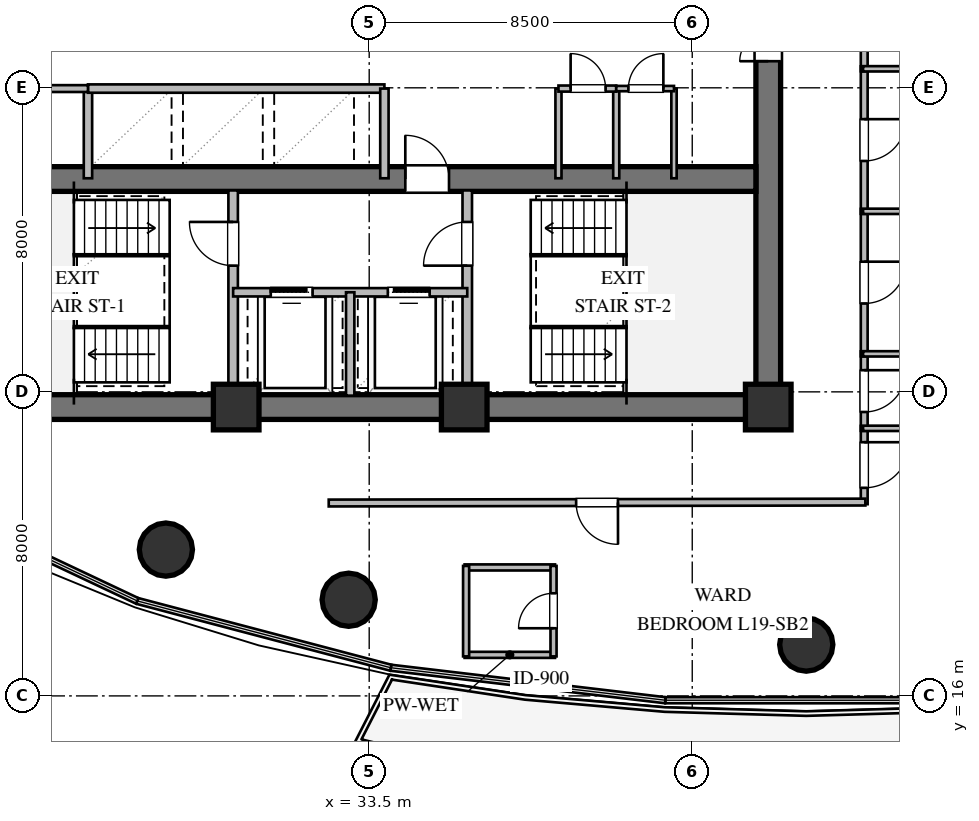
"""IFC4 building model, lengths in metres.
Left out: names, types, materials, properties, quantities, classifications, styles, units other than length and angle.
Written with IfcOpenShell. Run it as: python <this file> out.ifc"""

import sys

from ifc_helpers import new_model, si_unit, direction, frame, frame_2d, origin, origin_2d, place, context, subcontext, project, spatial, rectangle, circle, extrude, element, fill, save


model = new_model("IFC4")
c1 = context("Model", 3, precision=1e-05, world=origin(), true_north=direction((0.0, 1.0)))
c2 = subcontext(c1, "Body", "Model", "MODEL_VIEW")
j1 = project(units=[si_unit("LENGTHUNIT", "METRE"), si_unit("PLANEANGLEUNIT", "RADIAN")], contexts=[c1])
p1 = place(None, origin())
s1 = spatial("IfcSite", under=j1, at=p1, CompositionType="ELEMENT")
p2 = place(p1, origin())
s2 = spatial("IfcBuilding", under=s1, at=p2, CompositionType="ELEMENT")
p3 = place(p2, frame((0.0, 0.0, 74.4)))
s3 = spatial("IfcBuildingStorey", under=s2, at=p3, CompositionType="ELEMENT", Elevation=74.4)
p4 = place(p3, frame((21.675, 23.6, 0.0), z_axis=(0.0, 0.0, 1.0), x_axis=(1.0, 0.0, 0.0)))
e1 = element("IfcWall", 1, at=p4, inside=s3, PredefinedType="SHEAR", context=c2, shape_type="SweptSolid", body=[
    extrude(rectangle(XDim=22.65, YDim=0.65, at=frame_2d((11.325, 0.0))), origin(), (0.0, 0.0, 1.0), 3.36),
])
p5 = place(p3, frame((44.0, 23.925, 0.0), z_axis=(0.0, 0.0, 1.0), x_axis=(0.0, 1.0, 0.0)))
e2 = element("IfcWall", 2, at=p5, inside=s3, PredefinedType="SHEAR", context=c2, shape_type="SweptSolid", body=[
    extrude(rectangle(XDim=12.15, YDim=0.65, at=frame_2d((6.075, 0.0))), origin(), (0.0, 0.0, 1.0), 3.36),
])
p6 = place(p5, frame((8.775, 0.0, 0.0)))
e3 = element("IfcOpeningElement", 3, at=p6, cuts=e2, PredefinedType="OPENING", context=c2, shape_type="SweptSolid", body=[
    extrude(rectangle(XDim=1.5, YDim=2.15, at=frame_2d((0.75, 1.075))), frame((0.0, 0.335, 0.0), z_axis=(0.0, -1.0, 0.0), x_axis=(1.0, 0.0, 0.0)), (0.0, 0.0, 1.0), 0.67),
])
p7 = place(p3, frame((22.325, 29.6, 0.0), z_axis=(0.0, 0.0, 1.0), x_axis=(1.0, 0.0, 0.0)))
e4 = element("IfcWall", 4, at=p7, inside=s3, PredefinedType="SHEAR", context=c2, shape_type="SweptSolid", body=[
    extrude(rectangle(XDim=21.35, YDim=0.65, at=frame_2d((10.675, 0.0))), origin(), (0.0, 0.0, 1.0), 3.36),
])
p8 = place(p7, frame((12.125, 0.0, 0.0)))
e5 = element("IfcOpeningElement", 5, at=p8, cuts=e4, PredefinedType="OPENING", context=c2, shape_type="SweptSolid", body=[
    extrude(rectangle(XDim=1.15, YDim=2.1, at=frame_2d((0.575, 1.05))), frame((0.0, 0.335, 0.0), z_axis=(0.0, -1.0, 0.0), x_axis=(1.0, 0.0, 0.0)), (0.0, 0.0, 1.0), 0.67),
])
for number, where, z_axis, x_axis in (
    (6, (30.0, 23.6, 0.0), (0.0, 0.0, 1.0), (1.0, 0.0, 0.0)),
    (7, (36.0, 23.6, 0.0), (0.0, 0.0, 1.0), (1.0, 0.0, 0.0)),
    (8, (44.0, 23.6, 0.0), (0.0, 0.0, 1.0), (1.0, 0.0, 0.0)),
):
    element("IfcColumn", number, at=place(p3, frame(where, z_axis=z_axis, x_axis=x_axis)), inside=s3, PredefinedType="COLUMN", context=c2, shape_type="SweptSolid", body=[
        extrude(rectangle(XDim=1.2, YDim=1.2, at=origin_2d()), origin(), (0.0, 0.0, 1.0), 3.6),
    ])
for number, where, z_axis, x_axis in (
    (9, (28.15, 19.85, 0.0), (0.0, 0.0, 1.0), (1.0, 0.0, 0.0)),
    (10, (32.96, 18.53, 0.0), (0.0, 0.0, 1.0), (1.0, 0.0, 0.0)),
    (11, (45.0, 17.35, 0.0), (0.0, 0.0, 1.0), (1.0, 0.0, 0.0)),
):
    element("IfcColumn", number, at=place(p3, frame(where, z_axis=z_axis, x_axis=x_axis)), inside=s3, PredefinedType="COLUMN", context=c2, shape_type="SweptSolid", body=[
        extrude(circle(Radius=0.7, at=origin_2d()), origin(), (0.0, 0.0, 1.0), 3.6),
    ])
p9 = place(p3, frame((29.92, 23.9, 0.0), z_axis=(0.0, 0.0, 1.0), x_axis=(0.0, 1.0, 0.0)))
e12 = element("IfcWall", 12, at=p9, inside=s3, PredefinedType="SOLIDWALL", context=c2, shape_type="SweptSolid", body=[
    extrude(rectangle(XDim=5.4, YDim=0.25, at=frame_2d((2.7, 0.0))), origin(), (0.0, 0.0, 1.0), 3.36),
])
p10 = place(p9, frame((3.421, 0.0, 0.0)))
e13 = element("IfcOpeningElement", 13, at=p10, cuts=e12, PredefinedType="OPENING", context=c2, shape_type="SweptSolid", body=[
    extrude(rectangle(XDim=1.15, YDim=2.1, at=frame_2d((0.575, 1.05))), frame((0.0, 0.135, 0.0), z_axis=(0.0, -1.0, 0.0), x_axis=(1.0, 0.0, 0.0)), (0.0, 0.0, 1.0), 0.27),
])
p11 = place(p3, frame((36.08, 23.9, 0.0), z_axis=(0.0, 0.0, 1.0), x_axis=(0.0, 1.0, 0.0)))
e14 = element("IfcWall", 14, at=p11, inside=s3, PredefinedType="SOLIDWALL", context=c2, shape_type="SweptSolid", body=[
    extrude(rectangle(XDim=5.4, YDim=0.25, at=frame_2d((2.7, 0.0))), origin(), (0.0, 0.0, 1.0), 3.36),
])
p12 = place(p11, frame((3.421, 0.0, 0.0)))
e15 = element("IfcOpeningElement", 15, at=p12, cuts=e14, PredefinedType="OPENING", context=c2, shape_type="SweptSolid", body=[
    extrude(rectangle(XDim=1.15, YDim=2.1, at=frame_2d((0.575, 1.05))), frame((0.0, 0.135, 0.0), z_axis=(0.0, -1.0, 0.0), x_axis=(1.0, 0.0, 0.0)), (0.0, 0.0, 1.0), 0.27),
])
p13 = place(p3, frame((29.92, 26.62, 0.0), z_axis=(0.0, 0.0, 1.0), x_axis=(1.0, 0.0, 0.0)))
e16 = element("IfcWall", 16, at=p13, inside=s3, PredefinedType="SOLIDWALL", context=c2, shape_type="SweptSolid", body=[
    extrude(rectangle(XDim=6.16, YDim=0.22, at=frame_2d((3.08, 0.0))), origin(), (0.0, 0.0, 1.0), 3.36),
])
p14 = place(p13, frame((0.99, 0.0, 0.0)))
e17 = element("IfcOpeningElement", 17, at=p14, cuts=e16, PredefinedType="OPENING", context=c2, shape_type="SweptSolid", body=[
    extrude(rectangle(XDim=1.1, YDim=2.1, at=frame_2d((0.55, 1.05))), frame((0.0, 0.12, 0.0), z_axis=(0.0, -1.0, 0.0), x_axis=(1.0, 0.0, 0.0)), (0.0, 0.0, 1.0), 0.24),
])
p15 = place(p13, frame((4.07, 0.0, 0.0)))
e18 = element("IfcOpeningElement", 18, at=p15, cuts=e16, PredefinedType="OPENING", context=c2, shape_type="SweptSolid", body=[
    extrude(rectangle(XDim=1.1, YDim=2.1, at=frame_2d((0.55, 1.05))), frame((0.0, 0.12, 0.0), z_axis=(0.0, -1.0, 0.0), x_axis=(1.0, 0.0, 0.0)), (0.0, 0.0, 1.0), 0.24),
])
p16 = place(p3, frame((33.0, 23.9, 0.0), z_axis=(0.0, 0.0, 1.0), x_axis=(0.0, 1.0, 0.0)))
e19 = element("IfcWall", 19, at=p16, inside=s3, PredefinedType="SOLIDWALL", context=c2, shape_type="SweptSolid", body=[
    extrude(rectangle(XDim=2.72, YDim=0.22, at=frame_2d((1.36, 0.0))), origin(), (0.0, 0.0, 1.0), 3.36),
])
p17 = place(p3, frame((26.1, 29.62, 0.0), z_axis=(0.0, 0.0, 1.0), x_axis=(0.0, 1.0, 0.0)))
e20 = element("IfcWall", 20, at=p17, inside=s3, PredefinedType="SOLIDWALL", context=c2, shape_type="SweptSolid", body=[
    extrude(rectangle(XDim=2.36, YDim=0.22, at=frame_2d((1.18, 0.0))), origin(), (0.0, 0.0, 1.0), 3.36),
])
p18 = place(p3, frame((26.1, 31.98, 0.0), z_axis=(0.0, 0.0, 1.0), x_axis=(1.0, 0.0, 0.0)))
e21 = element("IfcWall", 21, at=p18, inside=s3, PredefinedType="SOLIDWALL", context=c2, shape_type="SweptSolid", body=[
    extrude(rectangle(XDim=7.8, YDim=0.22, at=frame_2d((3.9, 0.0))), origin(), (0.0, 0.0, 1.0), 3.36),
])
p19 = place(p3, frame((33.9, 29.62, 0.0), z_axis=(0.0, 0.0, 1.0), x_axis=(0.0, 1.0, 0.0)))
e22 = element("IfcWall", 22, at=p19, inside=s3, PredefinedType="SOLIDWALL", context=c2, shape_type="SweptSolid", body=[
    extrude(rectangle(XDim=2.36, YDim=0.22, at=frame_2d((1.18, 0.0))), origin(), (0.0, 0.0, 1.0), 3.36),
])
p20 = place(p3, frame((22.35, 31.98, 0.0), z_axis=(0.0, 0.0, 1.0), x_axis=(1.0, 0.0, 0.0)))
e23 = element("IfcWall", 23, at=p20, inside=s3, PredefinedType="PARTITIONING", context=c2, shape_type="SweptSolid", body=[
    extrude(rectangle(XDim=3.75, YDim=0.18, at=frame_2d((1.875, 0.0))), origin(), (0.0, 0.0, 1.0), 3.36),
])
p21 = place(p20, frame((1.425, 0.0, 0.0)))
e24 = element("IfcOpeningElement", 24, at=p21, cuts=e23, PredefinedType="OPENING", context=c2, shape_type="SweptSolid", body=[
    extrude(rectangle(XDim=0.92, YDim=2.1, at=frame_2d((0.46, 1.05))), frame((0.0, 0.1, 0.0), z_axis=(0.0, -1.0, 0.0), x_axis=(1.0, 0.0, 0.0)), (0.0, 0.0, 1.0), 0.2),
])
for number, where, z_axis, x_axis in (
    (25, (38.48, 29.62, 0.0), (0.0, 0.0, 1.0), (0.0, 1.0, 0.0)),
    (26, (40.0, 29.62, 0.0), (0.0, 0.0, 1.0), (0.0, 1.0, 0.0)),
):
    element("IfcWall", number, at=place(p3, frame(where, z_axis=z_axis, x_axis=x_axis)), inside=s3, PredefinedType="PLUMBINGWALL", context=c2, shape_type="SweptSolid", body=[
        extrude(rectangle(XDim=2.36, YDim=0.16, at=frame_2d((1.18, 0.0))), origin(), (0.0, 0.0, 1.0), 3.36),
    ])
p22 = place(p3, frame((41.52, 29.62, 0.0), z_axis=(0.0, 0.0, 1.0), x_axis=(0.0, 1.0, 0.0)))
e27 = element("IfcWall", 27, at=p22, inside=s3, PredefinedType="PARTITIONING", context=c2, shape_type="SweptSolid", body=[
    extrude(rectangle(XDim=2.36, YDim=0.14, at=frame_2d((1.18, 0.0))), origin(), (0.0, 0.0, 1.0), 3.36),
])
p23 = place(p3, frame((38.48, 31.98, 0.0), z_axis=(0.0, 0.0, 1.0), x_axis=(1.0, 0.0, 0.0)))
e28 = element("IfcWall", 28, at=p23, inside=s3, PredefinedType="PLUMBINGWALL", context=c2, shape_type="SweptSolid", body=[
    extrude(rectangle(XDim=1.52, YDim=0.16, at=frame_2d((0.76, 0.0))), origin(), (0.0, 0.0, 1.0), 3.36),
])
p24 = place(p23, frame((0.32, 0.0, 0.0)))
e29 = element("IfcOpeningElement", 29, at=p24, cuts=e28, PredefinedType="OPENING", context=c2, shape_type="SweptSolid", body=[
    extrude(rectangle(XDim=0.92, YDim=2.1, at=frame_2d((0.46, 1.05))), frame((0.0, 0.09, 0.0), z_axis=(0.0, -1.0, 0.0), x_axis=(1.0, 0.0, 0.0)), (0.0, 0.0, 1.0), 0.18),
])
p25 = place(p3, frame((40.0, 31.98, 0.0), z_axis=(0.0, 0.0, 1.0), x_axis=(1.0, 0.0, 0.0)))
e30 = element("IfcWall", 30, at=p25, inside=s3, PredefinedType="PARTITIONING", context=c2, shape_type="SweptSolid", body=[
    extrude(rectangle(XDim=1.52, YDim=0.14, at=frame_2d((0.76, 0.0))), origin(), (0.0, 0.0, 1.0), 3.36),
])
p26 = place(p25, frame((0.32, 0.0, 0.0)))
e31 = element("IfcOpeningElement", 31, at=p26, cuts=e30, PredefinedType="OPENING", context=c2, shape_type="SweptSolid", body=[
    extrude(rectangle(XDim=0.92, YDim=2.1, at=frame_2d((0.46, 1.05))), frame((0.0, 0.08, 0.0), z_axis=(0.0, -1.0, 0.0), x_axis=(1.0, 0.0, 0.0)), (0.0, 0.0, 1.0), 0.16),
])
for number, where, z_axis, x_axis in (
    (32, (36.01, 17.08, 0.0), (0.0, 0.0, 1.0), (1.0, 0.0, 0.0)),
    (33, (36.01, 19.38, 0.0), (0.0, 0.0, 1.0), (1.0, 0.0, 0.0)),
    (34, (36.05, 17.04, 0.0), (0.0, 0.0, 1.0), (0.0, 1.0, 0.0)),
):
    element("IfcWall", number, at=place(p3, frame(where, z_axis=z_axis, x_axis=x_axis)), inside=s3, PredefinedType="PLUMBINGWALL", context=c2, shape_type="SweptSolid", body=[
        extrude(rectangle(XDim=2.38, YDim=0.16, at=frame_2d((1.19, 0.0))), origin(), (0.0, 0.0, 1.0), 3.36),
    ])
p27 = place(p3, frame((38.35, 17.04, 0.0), z_axis=(0.0, 0.0, 1.0), x_axis=(0.0, 1.0, 0.0)))
e35 = element("IfcWall", 35, at=p27, inside=s3, PredefinedType="PLUMBINGWALL", context=c2, shape_type="SweptSolid", body=[
    extrude(rectangle(XDim=2.38, YDim=0.16, at=frame_2d((1.19, 0.0))), origin(), (0.0, 0.0, 1.0), 3.36),
])
p28 = place(p27, frame((0.74, 0.0, 0.0)))
e36 = element("IfcOpeningElement", 36, at=p28, cuts=e35, PredefinedType="OPENING", context=c2, shape_type="SweptSolid", body=[
    extrude(rectangle(XDim=0.92, YDim=2.1, at=frame_2d((0.46, 1.05))), frame((0.0, 0.09, 0.0), z_axis=(0.0, -1.0, 0.0), x_axis=(1.0, 0.0, 0.0)), (0.0, 0.0, 1.0), 0.18),
])
p29 = place(p3, frame((46.525, 23.105, 0.0), z_axis=(0.0, 0.0, 1.0), x_axis=(0.0, -1.0, 0.0)))
e37 = element("IfcWall", 37, at=p29, inside=s3, PredefinedType="PARTITIONING", context=c2, shape_type="SweptSolid", body=[
    extrude(rectangle(XDim=2.06, YDim=0.18, at=frame_2d((1.03, 0.0))), origin(), (0.0, 0.0, 1.0), 3.36),
])
p30 = place(p29, frame((0.43, 0.0, 0.0)))
e38 = element("IfcOpeningElement", 38, at=p30, cuts=e37, PredefinedType="OPENING", context=c2, shape_type="SweptSolid", body=[
    extrude(rectangle(XDim=1.2, YDim=2.15, at=frame_2d((0.6, 1.075))), frame((0.0, 0.1, 0.0), z_axis=(0.0, -1.0, 0.0), x_axis=(1.0, 0.0, 0.0)), (0.0, 0.0, 1.0), 0.2),
])
p31 = place(p3, frame((46.525, 25.065, 0.0), z_axis=(0.0, 0.0, 1.0), x_axis=(0.0, -1.0, 0.0)))
e39 = element("IfcWall", 39, at=p31, inside=s3, PredefinedType="PARTITIONING", context=c2, shape_type="SweptSolid", body=[
    extrude(rectangle(XDim=2.09, YDim=0.18, at=frame_2d((1.045, 0.0))), origin(), (0.0, 0.0, 1.0), 3.36),
])
p32 = place(p31, frame((0.495, 0.0, 0.0)))
e40 = element("IfcOpeningElement", 40, at=p32, cuts=e39, PredefinedType="OPENING", context=c2, shape_type="SweptSolid", body=[
    extrude(rectangle(XDim=1.1, YDim=2.1, at=frame_2d((0.55, 1.05))), frame((0.0, 0.1, 0.0), z_axis=(0.0, -1.0, 0.0), x_axis=(1.0, 0.0, 0.0)), (0.0, 0.0, 1.0), 0.2),
])
p33 = place(p3, frame((46.525, 28.815, 0.0), z_axis=(0.0, 0.0, 1.0), x_axis=(0.0, -1.0, 0.0)))
e41 = element("IfcWall", 41, at=p33, inside=s3, PredefinedType="PARTITIONING", context=c2, shape_type="SweptSolid", body=[
    extrude(rectangle(XDim=3.88, YDim=0.18, at=frame_2d((1.94, 0.0))), origin(), (0.0, 0.0, 1.0), 3.36),
])
p34 = place(p33, frame((1.39, 0.0, 0.0)))
e42 = element("IfcOpeningElement", 42, at=p34, cuts=e41, PredefinedType="OPENING", context=c2, shape_type="SweptSolid", body=[
    extrude(rectangle(XDim=1.1, YDim=2.1, at=frame_2d((0.55, 1.05))), frame((0.0, 0.1, 0.0), z_axis=(0.0, -1.0, 0.0), x_axis=(1.0, 0.0, 0.0)), (0.0, 0.0, 1.0), 0.2),
])
p35 = place(p3, frame((46.525, 32.565, 0.0), z_axis=(0.0, 0.0, 1.0), x_axis=(0.0, -1.0, 0.0)))
e43 = element("IfcWall", 43, at=p35, inside=s3, PredefinedType="PARTITIONING", context=c2, shape_type="SweptSolid", body=[
    extrude(rectangle(XDim=3.88, YDim=0.18, at=frame_2d((1.94, 0.0))), origin(), (0.0, 0.0, 1.0), 3.36),
])
p36 = place(p35, frame((1.39, 0.0, 0.0)))
e44 = element("IfcOpeningElement", 44, at=p36, cuts=e43, PredefinedType="OPENING", context=c2, shape_type="SweptSolid", body=[
    extrude(rectangle(XDim=1.1, YDim=2.1, at=frame_2d((0.55, 1.05))), frame((0.0, 0.1, 0.0), z_axis=(0.0, -1.0, 0.0), x_axis=(1.0, 0.0, 0.0)), (0.0, 0.0, 1.0), 0.2),
])
p37 = place(p3, frame((46.525, 35.775, 0.0), z_axis=(0.0, 0.0, 1.0), x_axis=(0.0, -1.0, 0.0)))
e45 = element("IfcWall", 45, at=p37, inside=s3, PredefinedType="PARTITIONING", context=c2, shape_type="SweptSolid", body=[
    extrude(rectangle(XDim=3.34, YDim=0.18, at=frame_2d((1.67, 0.0))), origin(), (0.0, 0.0, 1.0), 3.36),
])
p38 = place(p37, frame((1.12, 0.0, 0.0)))
e46 = element("IfcOpeningElement", 46, at=p38, cuts=e45, PredefinedType="OPENING", context=c2, shape_type="SweptSolid", body=[
    extrude(rectangle(XDim=1.1, YDim=2.1, at=frame_2d((0.55, 1.05))), frame((0.0, 0.1, 0.0), z_axis=(0.0, -1.0, 0.0), x_axis=(1.0, 0.0, 0.0)), (0.0, 0.0, 1.0), 0.2),
])
p39 = place(p3, frame((46.555, 21.1, 0.0), z_axis=(0.0, 0.0, 1.0), x_axis=(-0.999998414151, -0.001780925679, 0.0)))
e47 = element("IfcWall", 47, at=p39, inside=s3, PredefinedType="PARTITIONING", context=c2, shape_type="SweptSolid", body=[
    extrude(rectangle(XDim=14.12, YDim=0.18, at=frame_2d((7.06, 0.0))), origin(), (0.0, 0.0, 1.0), 2.996),
])
p40 = place(p39, frame((6.51, 0.0, 0.0)))
e48 = element("IfcOpeningElement", 48, at=p40, cuts=e47, PredefinedType="OPENING", context=c2, shape_type="SweptSolid", body=[
    extrude(rectangle(XDim=1.1, YDim=2.1, at=frame_2d((0.55, 1.05))), frame((0.0, 0.1, 0.0), z_axis=(0.0, -1.0, 0.0), x_axis=(1.0, 0.0, 0.0)), (0.0, 0.0, 1.0), 0.2),
])
p41 = place(p3, frame((46.495, 23.04, 0.0), z_axis=(0.0, 0.0, 1.0), x_axis=(1.0, 0.0, 0.0)))
e49 = element("IfcWall", 49, at=p41, inside=s3, PredefinedType="PARTITIONING", context=c2, shape_type="SweptSolid", body=[
    extrude(rectangle(XDim=24.806, YDim=0.14, at=frame_2d((12.403, 0.0))), origin(), (0.0, 0.0, 1.0), 2.89),
])
p42 = place(p3, frame((46.495, 25.0, 0.0), z_axis=(0.0, 0.0, 1.0), x_axis=(1.0, 0.0, 0.0)))
e50 = element("IfcWall", 50, at=p42, inside=s3, PredefinedType="PARTITIONING", context=c2, shape_type="SweptSolid", body=[
    extrude(rectangle(XDim=26.49, YDim=0.14, at=frame_2d((13.245, 0.0))), origin(), (0.0, 0.0, 1.0), 2.89),
])
p43 = place(p3, frame((46.495, 28.75, 0.0), z_axis=(0.0, 0.0, 1.0), x_axis=(1.0, 0.0, 0.0)))
e51 = element("IfcWall", 51, at=p43, inside=s3, PredefinedType="PARTITIONING", context=c2, shape_type="SweptSolid", body=[
    extrude(rectangle(XDim=29.548, YDim=0.14, at=frame_2d((14.774, 0.0))), origin(), (0.0, 0.0, 1.0), 2.89),
])
p44 = place(p3, frame((46.495, 32.5, 0.0), z_axis=(0.0, 0.0, 1.0), x_axis=(1.0, 0.0, 0.0)))
e52 = element("IfcWall", 52, at=p44, inside=s3, PredefinedType="PARTITIONING", context=c2, shape_type="SweptSolid", body=[
    extrude(rectangle(XDim=31.127, YDim=0.14, at=frame_2d((15.563, 0.0))), origin(), (0.0, 0.0, 1.0), 3.36),
])
p45 = place(p10, origin())
e53 = element("IfcDoor", 53, at=p45, inside=s3, OperationType="SINGLE_SWING_RIGHT", PredefinedType="DOOR", context=c2, shape_type="SweptSolid", body=[
    extrude(rectangle(XDim=1.15, YDim=2.1, at=frame_2d((0.575, 1.05))), frame((0.0, 0.025, 0.0), z_axis=(0.0, -1.0, 0.0), x_axis=(1.0, 0.0, 0.0)), (0.0, 0.0, 1.0), 0.05),
])
fill(e13, e53)
p46 = place(p12, origin())
e54 = element("IfcDoor", 54, at=p46, inside=s3, OperationType="SINGLE_SWING_LEFT", PredefinedType="DOOR", context=c2, shape_type="SweptSolid", body=[
    extrude(rectangle(XDim=1.15, YDim=2.1, at=frame_2d((0.575, 1.05))), frame((0.0, 0.025, 0.0), z_axis=(0.0, -1.0, 0.0), x_axis=(1.0, 0.0, 0.0)), (0.0, 0.0, 1.0), 0.05),
])
fill(e15, e54)
p47 = place(p14, origin())
e55 = element("IfcDoor", 55, at=p47, inside=s3, OperationType="SLIDING_TO_LEFT", PredefinedType="DOOR", context=c2, shape_type="SweptSolid", body=[
    extrude(rectangle(XDim=1.1, YDim=2.1, at=frame_2d((0.55, 1.05))), frame((0.0, 0.025, 0.0), z_axis=(0.0, -1.0, 0.0), x_axis=(1.0, 0.0, 0.0)), (0.0, 0.0, 1.0), 0.05),
])
fill(e17, e55)
p48 = place(p15, origin())
e56 = element("IfcDoor", 56, at=p48, inside=s3, OperationType="SLIDING_TO_RIGHT", PredefinedType="DOOR", context=c2, shape_type="SweptSolid", body=[
    extrude(rectangle(XDim=1.1, YDim=2.1, at=frame_2d((0.55, 1.05))), frame((0.0, 0.025, 0.0), z_axis=(0.0, -1.0, 0.0), x_axis=(1.0, 0.0, 0.0)), (0.0, 0.0, 1.0), 0.05),
])
fill(e18, e56)
p49 = place(p8, origin())
e57 = element("IfcDoor", 57, at=p49, inside=s3, OperationType="SINGLE_SWING_LEFT", PredefinedType="DOOR", context=c2, shape_type="SweptSolid", body=[
    extrude(rectangle(XDim=1.15, YDim=2.1, at=frame_2d((0.575, 1.05))), frame((0.0, 0.025, 0.0), z_axis=(0.0, -1.0, 0.0), x_axis=(1.0, 0.0, 0.0)), (0.0, 0.0, 1.0), 0.05),
])
fill(e5, e57)
p50 = place(p6, origin())
e58 = element("IfcDoor", 58, at=p50, inside=s3, OperationType="DOUBLE_DOOR_SINGLE_SWING", PredefinedType="DOOR", context=c2, shape_type="SweptSolid", body=[
    extrude(rectangle(XDim=1.5, YDim=2.15, at=frame_2d((0.75, 1.075))), frame((0.0, 0.025, 0.0), z_axis=(0.0, -1.0, 0.0), x_axis=(1.0, 0.0, 0.0)), (0.0, 0.0, 1.0), 0.05),
])
fill(e3, e58)
p51 = place(p24, origin())
e59 = element("IfcDoor", 59, at=p51, inside=s3, OperationType="SINGLE_SWING_LEFT", PredefinedType="DOOR", context=c2, shape_type="SweptSolid", body=[
    extrude(rectangle(XDim=0.92, YDim=2.1, at=frame_2d((0.46, 1.05))), frame((0.0, 0.025, 0.0), z_axis=(0.0, -1.0, 0.0), x_axis=(1.0, 0.0, 0.0)), (0.0, 0.0, 1.0), 0.05),
])
fill(e29, e59)
p52 = place(p26, origin())
e60 = element("IfcDoor", 60, at=p52, inside=s3, OperationType="SINGLE_SWING_RIGHT", PredefinedType="DOOR", context=c2, shape_type="SweptSolid", body=[
    extrude(rectangle(XDim=0.92, YDim=2.1, at=frame_2d((0.46, 1.05))), frame((0.0, 0.025, 0.0), z_axis=(0.0, -1.0, 0.0), x_axis=(1.0, 0.0, 0.0)), (0.0, 0.0, 1.0), 0.05),
])
fill(e31, e60)
p53 = place(p28, origin())
e61 = element("IfcDoor", 61, at=p53, inside=s3, OperationType="SINGLE_SWING_LEFT", PredefinedType="DOOR", context=c2, shape_type="SweptSolid", body=[
    extrude(rectangle(XDim=0.92, YDim=2.1, at=frame_2d((0.46, 1.05))), frame((0.0, 0.025, 0.0), z_axis=(0.0, -1.0, 0.0), x_axis=(1.0, 0.0, 0.0)), (0.0, 0.0, 1.0), 0.05),
])
fill(e36, e61)
p54 = place(p30, origin())
e62 = element("IfcDoor", 62, at=p54, inside=s3, OperationType="SINGLE_SWING_LEFT", PredefinedType="DOOR", context=c2, shape_type="SweptSolid", body=[
    extrude(rectangle(XDim=1.2, YDim=2.15, at=frame_2d((0.6, 1.075))), frame((0.0, 0.025, 0.0), z_axis=(0.0, -1.0, 0.0), x_axis=(1.0, 0.0, 0.0)), (0.0, 0.0, 1.0), 0.05),
])
fill(e38, e62)
p55 = place(p32, origin())
e63 = element("IfcDoor", 63, at=p55, inside=s3, OperationType="SINGLE_SWING_LEFT", PredefinedType="DOOR", context=c2, shape_type="SweptSolid", body=[
    extrude(rectangle(XDim=1.1, YDim=2.1, at=frame_2d((0.55, 1.05))), frame((0.0, 0.025, 0.0), z_axis=(0.0, -1.0, 0.0), x_axis=(1.0, 0.0, 0.0)), (0.0, 0.0, 1.0), 0.05),
])
fill(e40, e63)
p56 = place(p34, origin())
e64 = element("IfcDoor", 64, at=p56, inside=s3, OperationType="SINGLE_SWING_LEFT", PredefinedType="DOOR", context=c2, shape_type="SweptSolid", body=[
    extrude(rectangle(XDim=1.1, YDim=2.1, at=frame_2d((0.55, 1.05))), frame((0.0, 0.025, 0.0), z_axis=(0.0, -1.0, 0.0), x_axis=(1.0, 0.0, 0.0)), (0.0, 0.0, 1.0), 0.05),
])
fill(e42, e64)
p57 = place(p36, origin())
e65 = element("IfcDoor", 65, at=p57, inside=s3, OperationType="SINGLE_SWING_LEFT", PredefinedType="DOOR", context=c2, shape_type="SweptSolid", body=[
    extrude(rectangle(XDim=1.1, YDim=2.1, at=frame_2d((0.55, 1.05))), frame((0.0, 0.025, 0.0), z_axis=(0.0, -1.0, 0.0), x_axis=(1.0, 0.0, 0.0)), (0.0, 0.0, 1.0), 0.05),
])
fill(e44, e65)
p58 = place(p40, origin())
e66 = element("IfcDoor", 66, at=p58, inside=s3, OperationType="SINGLE_SWING_LEFT", PredefinedType="DOOR", context=c2, shape_type="SweptSolid", body=[
    extrude(rectangle(XDim=1.1, YDim=2.1, at=frame_2d((0.55, 1.05))), frame((0.0, 0.025, 0.0), z_axis=(0.0, -1.0, 0.0), x_axis=(1.0, 0.0, 0.0)), (0.0, 0.0, 1.0), 0.05),
])
fill(e48, e66)
save(model, sys.argv[1])
